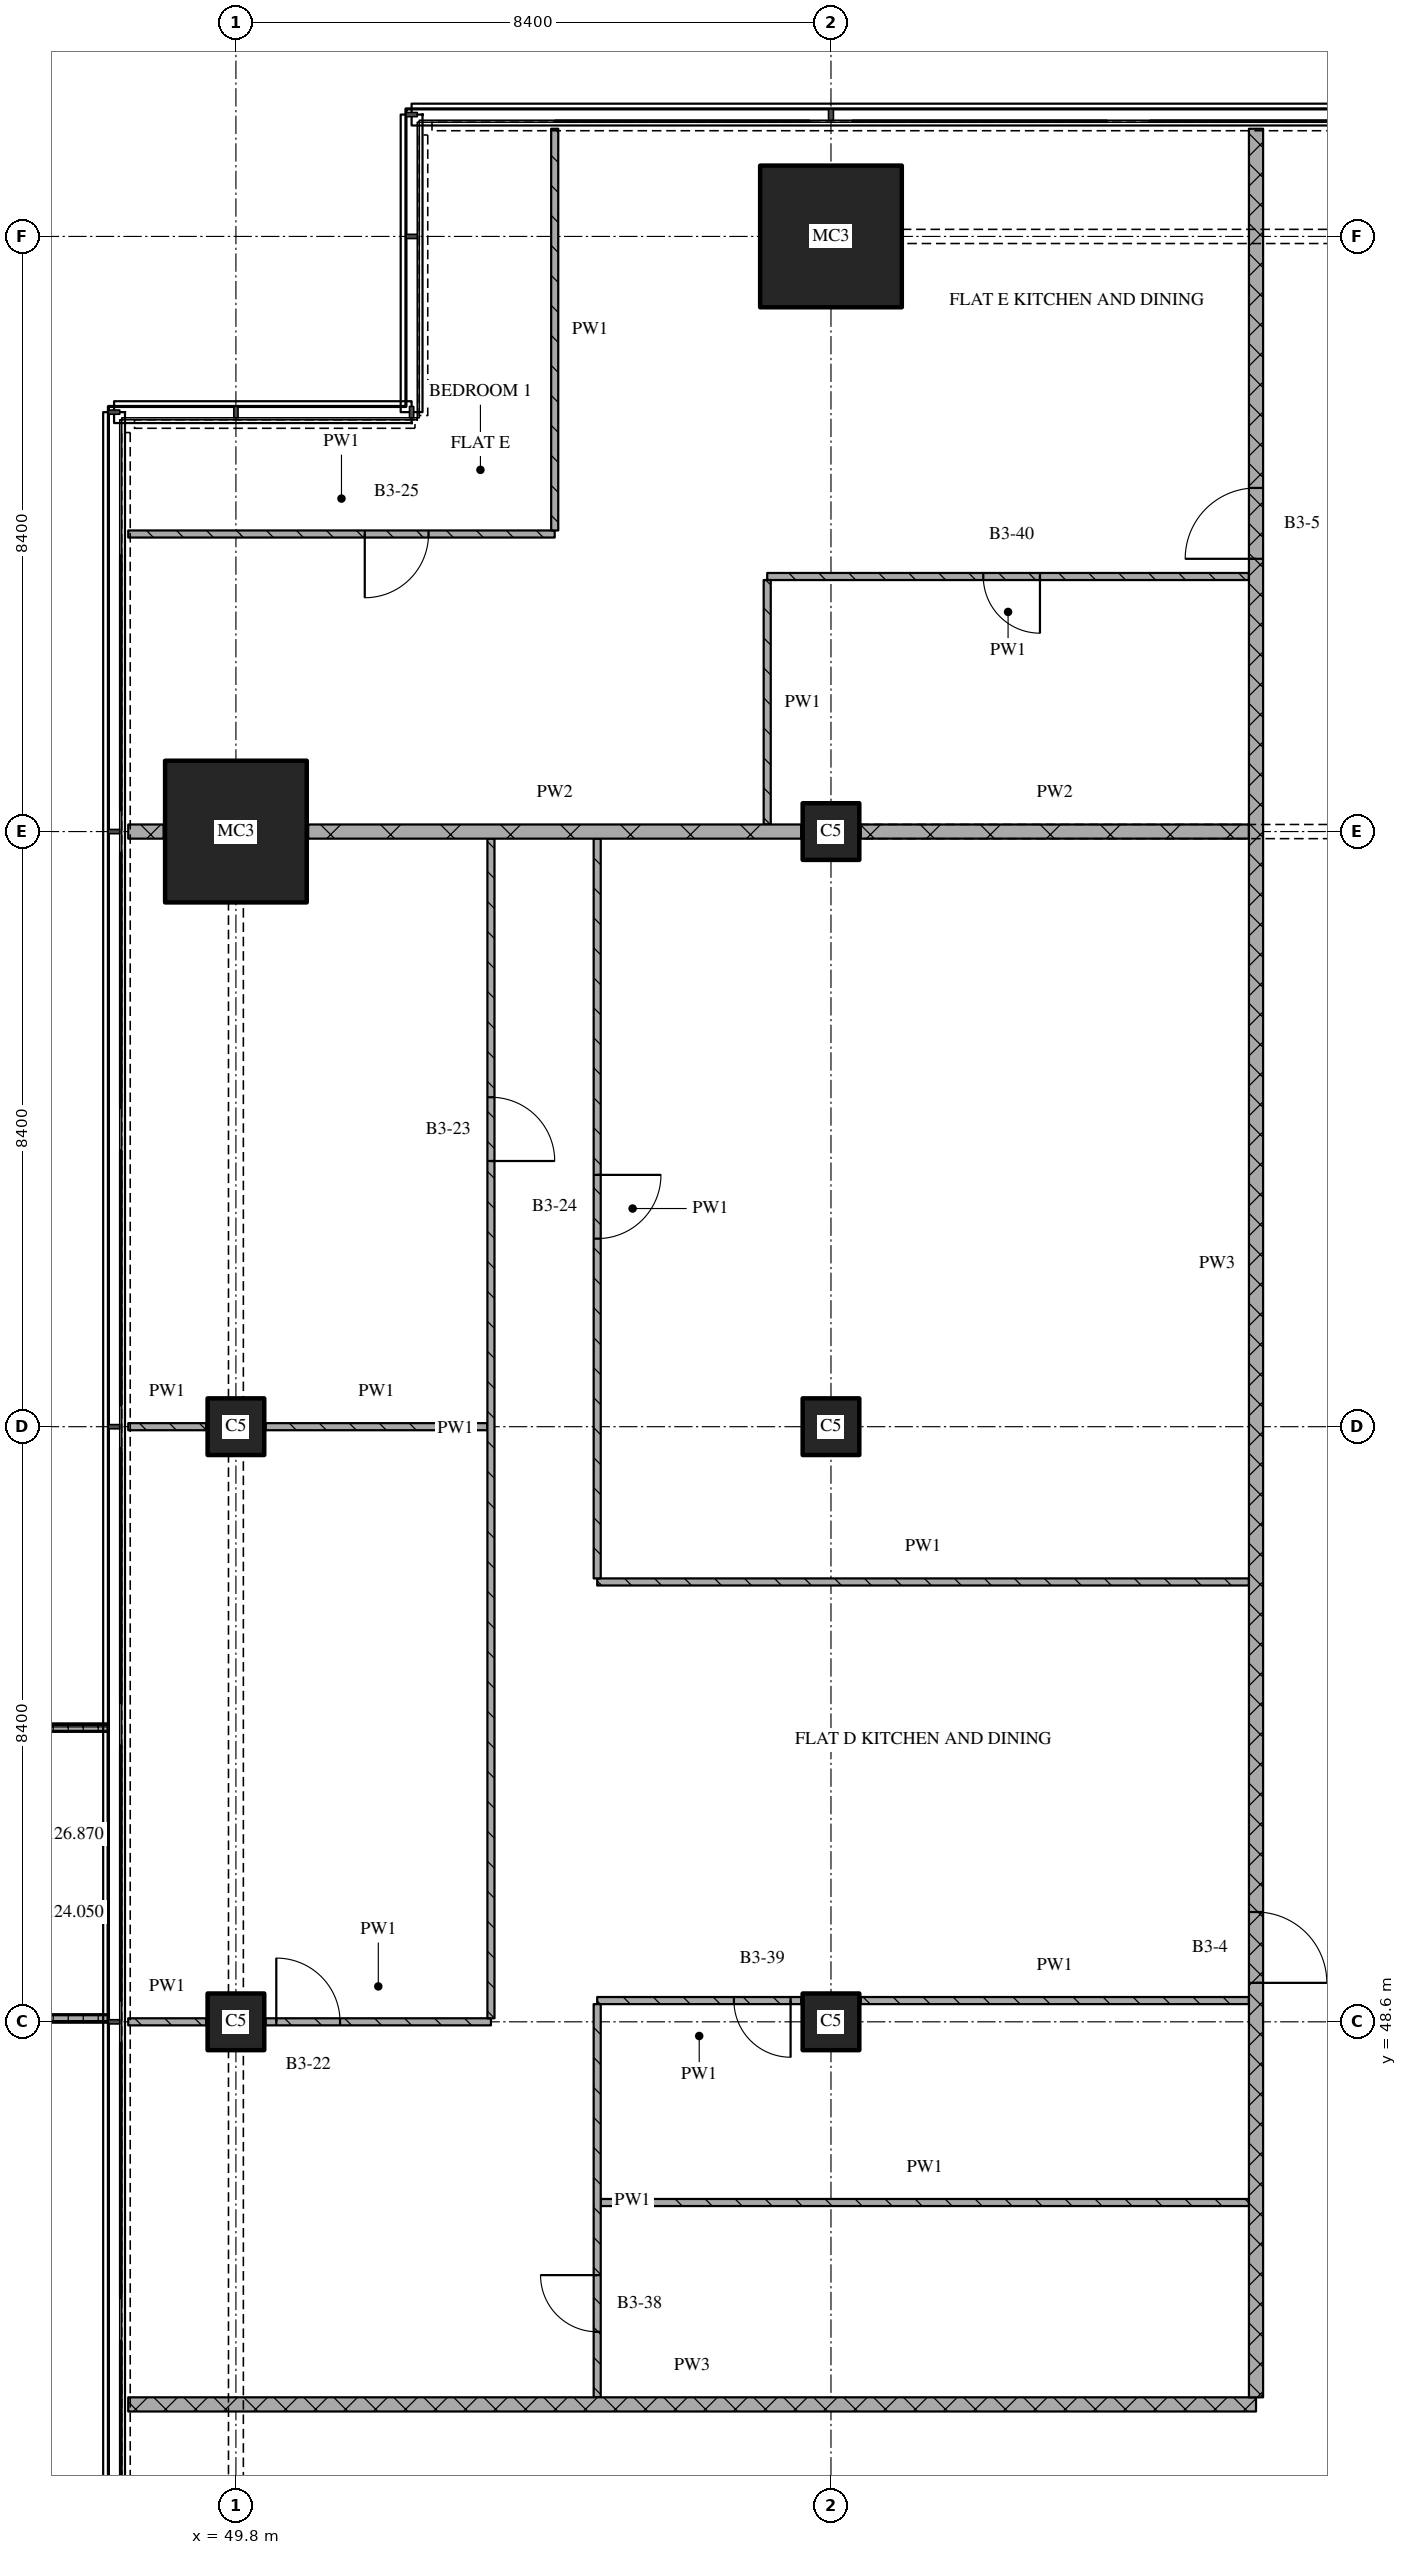
"""IFC4 building model, lengths in metres.
Left out: names, types, materials, properties, quantities, classifications, styles, units other than length and angle.
Written with IfcOpenShell. Run it as: python <this file> out.ifc"""

import sys

from ifc_helpers import new_model, si_unit, direction, frame, frame_2d, origin, origin_2d, place, context, subcontext, project, spatial, polyline, rectangle, outline, extrude, element, fill, save


model = new_model("IFC4")
c1 = context("Model", 3, precision=1e-05, world=origin(), true_north=direction((0.0, 1.0)))
c2 = subcontext(c1, "Body", "Model", "MODEL_VIEW")
j1 = project(units=[si_unit("LENGTHUNIT", "METRE"), si_unit("PLANEANGLEUNIT", "RADIAN")], contexts=[c1])
p1 = place(None, origin())
s1 = spatial("IfcSite", under=j1, at=p1, CompositionType="ELEMENT")
p2 = place(p1, origin())
s2 = spatial("IfcBuilding", under=s1, at=p2, CompositionType="ELEMENT")
p3 = place(p2, frame((0.0, 0.0, 124.05)))
s3 = spatial("IfcBuildingStorey", under=s2, at=p3, CompositionType="ELEMENT", Elevation=124.05)
for number, where, z_axis, x_axis in (
    (1, (49.8, 48.6, 0.0), (0.0, 0.0, 1.0), (1.0, 0.0, 0.0)),
    (2, (49.8, 57.0, 0.0), (0.0, 0.0, 1.0), (1.0, 0.0, 0.0)),
):
    element("IfcColumn", number, at=place(p3, frame(where, z_axis=z_axis, x_axis=x_axis)), inside=s3, PredefinedType="COLUMN", context=c2, shape_type="SweptSolid", body=[
        extrude(rectangle(XDim=0.8, YDim=0.8, at=origin_2d()), origin(), (0.0, 0.0, 1.0), 3.6),
    ])
p4 = place(p3, frame((49.8, 65.4, 0.0), z_axis=(0.0, 0.0, 1.0), x_axis=(1.0, 0.0, 0.0)))
e3 = element("IfcColumn", 3, at=p4, inside=s3, PredefinedType="COLUMN", context=c2, shape_type="SweptSolid", body=[
    extrude(rectangle(XDim=2.0, YDim=2.0, at=origin_2d()), origin(), (0.0, 0.0, 1.0), 3.6),
])
for number, where, z_axis, x_axis in (
    (4, (58.2, 48.6, 0.0), (0.0, 0.0, 1.0), (1.0, 0.0, 0.0)),
    (5, (58.2, 57.0, 0.0), (0.0, 0.0, 1.0), (1.0, 0.0, 0.0)),
    (6, (58.2, 65.4, 0.0), (0.0, 0.0, 1.0), (1.0, 0.0, 0.0)),
):
    element("IfcColumn", number, at=place(p3, frame(where, z_axis=z_axis, x_axis=x_axis)), inside=s3, PredefinedType="COLUMN", context=c2, shape_type="SweptSolid", body=[
        extrude(rectangle(XDim=0.8, YDim=0.8, at=origin_2d()), origin(), (0.0, 0.0, 1.0), 3.6),
    ])
p5 = place(p3, frame((58.2, 73.8, 0.0), z_axis=(0.0, 0.0, 1.0), x_axis=(1.0, 0.0, 0.0)))
e7 = element("IfcColumn", 7, at=p5, inside=s3, PredefinedType="COLUMN", context=c2, shape_type="SweptSolid", body=[
    extrude(rectangle(XDim=2.0, YDim=2.0, at=origin_2d()), origin(), (0.0, 0.0, 1.0), 3.6),
])
p6 = place(p3, origin())
e8 = element("IfcWall", 8, at=p6, inside=s3, PredefinedType="SOLIDWALL", context=c2, shape_type="SweptSolid", body=[
    extrude(outline(polyline([(48.0, 52.8), (48.0, 52.7), (46.367, 52.7), (46.367, 48.7), (48.0, 48.7), (48.0, 48.6), (46.267, 48.6), (46.267, 52.8), (48.0, 52.8)])), origin(), (0.0, 0.0, 1.0), 1.0),
])
p7 = place(p3, frame((48.28, 43.2, 0.0), z_axis=(0.0, 0.0, 1.0), x_axis=(1.0, 0.0, 0.0)))
e9 = element("IfcWall", 9, at=p7, inside=s3, PredefinedType="PARTITIONING", context=c2, shape_type="SweptSolid", body=[
    extrude(rectangle(XDim=15.92, YDim=0.2, at=frame_2d((7.96, 0.0))), origin(), (0.0, 0.0, 1.0), 3.32),
])
p8 = place(p3, frame((54.95, 46.05, 0.0), z_axis=(0.0, 0.0, 1.0), x_axis=(1.0, 0.0, 0.0)))
e10 = element("IfcWall", 10, at=p8, inside=s3, PredefinedType="PARTITIONING", context=c2, shape_type="SweptSolid", body=[
    extrude(rectangle(XDim=9.15, YDim=0.1, at=frame_2d((4.575, 0.0))), origin(), (0.0, 0.0, 1.0), 3.32),
])
p9 = place(p3, frame((48.28, 48.6, 0.0), z_axis=(0.0, 0.0, 1.0), x_axis=(1.0, 0.0, 0.0)))
e11 = element("IfcWall", 11, at=p9, inside=s3, PredefinedType="PARTITIONING", context=c2, shape_type="SweptSolid", body=[
    extrude(rectangle(XDim=1.1, YDim=0.1, at=frame_2d((0.55, 0.0))), origin(), (0.0, 0.0, 1.0), 3.32),
])
p10 = place(p3, frame((50.22, 48.6, 0.0), z_axis=(0.0, 0.0, 1.0), x_axis=(1.0, 0.0, 0.0)))
e12 = element("IfcWall", 12, at=p10, inside=s3, PredefinedType="PARTITIONING", context=c2, shape_type="SweptSolid", body=[
    extrude(rectangle(XDim=3.18, YDim=0.1, at=frame_2d((1.59, 0.0))), origin(), (0.0, 0.0, 1.0), 3.32),
])
p11 = place(p10, frame((0.15, 0.0, 0.0)))
e13 = element("IfcOpeningElement", 13, at=p11, cuts=e12, PredefinedType="OPENING", context=c2, shape_type="SweptSolid", body=[
    extrude(rectangle(XDim=0.9, YDim=2.1, at=frame_2d((0.45, 1.05))), frame((0.0, 0.06, 0.0), z_axis=(0.0, -1.0, 0.0), x_axis=(1.0, 0.0, 0.0)), (0.0, 0.0, 1.0), 0.12),
])
p12 = place(p3, frame((57.78, 48.9, 0.0), z_axis=(0.0, 0.0, 1.0), x_axis=(-1.0, 0.0, 0.0)))
e14 = element("IfcWall", 14, at=p12, inside=s3, PredefinedType="PARTITIONING", context=c2, shape_type="SweptSolid", body=[
    extrude(rectangle(XDim=2.88, YDim=0.1, at=frame_2d((1.44, 0.0))), origin(), (0.0, 0.0, 1.0), 3.32),
])
p13 = place(p12, frame((0.15, 0.0, 0.0)))
e15 = element("IfcOpeningElement", 15, at=p13, cuts=e14, PredefinedType="OPENING", context=c2, shape_type="SweptSolid", body=[
    extrude(rectangle(XDim=0.8, YDim=2.1, at=frame_2d((0.4, 1.05))), frame((0.0, 0.06, 0.0), z_axis=(0.0, -1.0, 0.0), x_axis=(1.0, 0.0, 0.0)), (0.0, 0.0, 1.0), 0.12),
])
p14 = place(p3, frame((58.62, 48.9, 0.0), z_axis=(0.0, 0.0, 1.0), x_axis=(1.0, 0.0, 0.0)))
e16 = element("IfcWall", 16, at=p14, inside=s3, PredefinedType="PARTITIONING", context=c2, shape_type="SweptSolid", body=[
    extrude(rectangle(XDim=5.48, YDim=0.1, at=frame_2d((2.74, 0.0))), origin(), (0.0, 0.0, 1.0), 3.32),
])
p15 = place(p3, frame((54.9, 54.809, 0.0), z_axis=(0.0, 0.0, 1.0), x_axis=(1.0, 0.0, 0.0)))
e17 = element("IfcWall", 17, at=p15, inside=s3, PredefinedType="PARTITIONING", context=c2, shape_type="SweptSolid", body=[
    extrude(rectangle(XDim=9.2, YDim=0.1, at=frame_2d((4.6, 0.0))), origin(), (0.0, 0.0, 1.0), 3.32),
])
p16 = place(p3, frame((48.28, 57.0, 0.0), z_axis=(0.0, 0.0, 1.0), x_axis=(1.0, 0.0, 0.0)))
e18 = element("IfcWall", 18, at=p16, inside=s3, PredefinedType="PARTITIONING", context=c2, shape_type="SweptSolid", body=[
    extrude(rectangle(XDim=1.1, YDim=0.1, at=frame_2d((0.55, 0.0))), origin(), (0.0, 0.0, 1.0), 3.32),
])
p17 = place(p3, frame((50.22, 57.0, 0.0), z_axis=(0.0, 0.0, 1.0), x_axis=(1.0, 0.0, 0.0)))
e19 = element("IfcWall", 19, at=p17, inside=s3, PredefinedType="PARTITIONING", context=c2, shape_type="SweptSolid", body=[
    extrude(rectangle(XDim=3.13, YDim=0.1, at=frame_2d((1.565, 0.0))), origin(), (0.0, 0.0, 1.0), 3.32),
])
p18 = place(p3, frame((48.28, 65.4, 0.0), z_axis=(0.0, 0.0, 1.0), x_axis=(1.0, 0.0, 0.0)))
e20 = element("IfcWall", 20, at=p18, inside=s3, PredefinedType="PARTITIONING", context=c2, shape_type="SweptSolid", body=[
    extrude(rectangle(XDim=0.5, YDim=0.2, at=frame_2d((0.25, 0.0))), origin(), (0.0, 0.0, 1.0), 3.32),
])
p19 = place(p3, frame((50.82, 65.4, 0.0), z_axis=(0.0, 0.0, 1.0), x_axis=(1.0, 0.0, 0.0)))
e21 = element("IfcWall", 21, at=p19, inside=s3, PredefinedType="PARTITIONING", context=c2, shape_type="SweptSolid", body=[
    extrude(rectangle(XDim=6.96, YDim=0.2, at=frame_2d((3.48, 0.0))), origin(), (0.0, 0.0, 1.0), 3.32),
])
p20 = place(p3, frame((58.62, 65.4, 0.0), z_axis=(0.0, 0.0, 1.0), x_axis=(1.0, 0.0, 0.0)))
e22 = element("IfcWall", 22, at=p20, inside=s3, PredefinedType="PARTITIONING", context=c2, shape_type="SweptSolid", body=[
    extrude(rectangle(XDim=5.48, YDim=0.2, at=frame_2d((2.74, 0.0))), origin(), (0.0, 0.0, 1.0), 2.82),
])
p21 = place(p3, frame((64.1, 69.0, 0.0), z_axis=(0.0, 0.0, 1.0), x_axis=(-1.0, 0.0, 0.0)))
e23 = element("IfcWall", 23, at=p21, inside=s3, PredefinedType="PARTITIONING", context=c2, shape_type="SweptSolid", body=[
    extrude(rectangle(XDim=6.8, YDim=0.1, at=frame_2d((3.4, 0.0))), origin(), (0.0, 0.0, 1.0), 3.32),
])
p22 = place(p21, frame((2.95, 0.0, 0.0)))
e24 = element("IfcOpeningElement", 24, at=p22, cuts=e23, PredefinedType="OPENING", context=c2, shape_type="SweptSolid", body=[
    extrude(rectangle(XDim=0.8, YDim=2.1, at=frame_2d((0.4, 1.05))), frame((0.0, 0.06, 0.0), z_axis=(0.0, -1.0, 0.0), x_axis=(1.0, 0.0, 0.0)), (0.0, 0.0, 1.0), 0.12),
])
p23 = place(p3, frame((48.28, 69.6, 0.0), z_axis=(0.0, 0.0, 1.0), x_axis=(1.0, 0.0, 0.0)))
e25 = element("IfcWall", 25, at=p23, inside=s3, PredefinedType="PARTITIONING", context=c2, shape_type="SweptSolid", body=[
    extrude(rectangle(XDim=6.02, YDim=0.1, at=frame_2d((3.01, 0.0))), origin(), (0.0, 0.0, 1.0), 3.32),
])
p24 = place(p23, frame((3.339, 0.0, 0.0)))
e26 = element("IfcOpeningElement", 26, at=p24, cuts=e25, PredefinedType="OPENING", context=c2, shape_type="SweptSolid", body=[
    extrude(rectangle(XDim=0.9, YDim=2.1, at=frame_2d((0.45, 1.05))), frame((0.0, 0.06, 0.0), z_axis=(0.0, -1.0, 0.0), x_axis=(1.0, 0.0, 0.0)), (0.0, 0.0, 1.0), 0.12),
])
p25 = place(p3, frame((53.4, 48.65, 0.0), z_axis=(0.0, 0.0, 1.0), x_axis=(0.0, 1.0, 0.0)))
e27 = element("IfcWall", 27, at=p25, inside=s3, PredefinedType="PARTITIONING", context=c2, shape_type="SweptSolid", body=[
    extrude(rectangle(XDim=16.65, YDim=0.1, at=frame_2d((8.325, 0.0))), origin(), (0.0, 0.0, 1.0), 3.32),
])
p26 = place(p25, frame((12.1, 0.0, 0.0)))
e28 = element("IfcOpeningElement", 28, at=p26, cuts=e27, PredefinedType="OPENING", context=c2, shape_type="SweptSolid", body=[
    extrude(rectangle(XDim=0.9, YDim=2.1, at=frame_2d((0.45, 1.05))), frame((0.0, 0.06, 0.0), z_axis=(0.0, -1.0, 0.0), x_axis=(1.0, 0.0, 0.0)), (0.0, 0.0, 1.0), 0.12),
])
p27 = place(p3, frame((54.3, 75.32, 0.0), z_axis=(0.0, 0.0, 1.0), x_axis=(0.0, -1.0, 0.0)))
e29 = element("IfcWall", 29, at=p27, inside=s3, PredefinedType="PARTITIONING", context=c2, shape_type="SweptSolid", body=[
    extrude(rectangle(XDim=5.67, YDim=0.1, at=frame_2d((2.835, 0.0))), origin(), (0.0, 0.0, 1.0), 3.32),
])
p28 = place(p3, frame((54.9, 48.85, 0.0), z_axis=(0.0, 0.0, 1.0), x_axis=(0.0, -1.0, 0.0)))
e30 = element("IfcWall", 30, at=p28, inside=s3, PredefinedType="PARTITIONING", context=c2, shape_type="SweptSolid", body=[
    extrude(rectangle(XDim=5.55, YDim=0.1, at=frame_2d((2.775, 0.0))), origin(), (0.0, 0.0, 1.0), 3.32),
])
p29 = place(p28, frame((3.825, 0.0, 0.0)))
e31 = element("IfcOpeningElement", 31, at=p29, cuts=e30, PredefinedType="OPENING", context=c2, shape_type="SweptSolid", body=[
    extrude(rectangle(XDim=0.8, YDim=2.1, at=frame_2d((0.4, 1.05))), frame((0.0, 0.06, 0.0), z_axis=(0.0, -1.0, 0.0), x_axis=(1.0, 0.0, 0.0)), (0.0, 0.0, 1.0), 0.12),
])
p30 = place(p3, frame((54.9, 65.3, 0.0), z_axis=(0.0, 0.0, 1.0), x_axis=(0.0, -1.0, 0.0)))
e32 = element("IfcWall", 32, at=p30, inside=s3, PredefinedType="PARTITIONING", context=c2, shape_type="SweptSolid", body=[
    extrude(rectangle(XDim=10.441, YDim=0.1, at=frame_2d((5.221, 0.0))), origin(), (0.0, 0.0, 1.0), 3.32),
])
p31 = place(p30, frame((4.746, 0.0, 0.0)))
e33 = element("IfcOpeningElement", 33, at=p31, cuts=e32, PredefinedType="OPENING", context=c2, shape_type="SweptSolid", body=[
    extrude(rectangle(XDim=0.9, YDim=2.1, at=frame_2d((0.45, 1.05))), frame((0.0, 0.06, 0.0), z_axis=(0.0, -1.0, 0.0), x_axis=(1.0, 0.0, 0.0)), (0.0, 0.0, 1.0), 0.12),
])
p32 = place(p3, frame((57.3, 68.95, 0.0), z_axis=(0.0, 0.0, 1.0), x_axis=(0.0, -1.0, 0.0)))
e34 = element("IfcWall", 34, at=p32, inside=s3, PredefinedType="PARTITIONING", context=c2, shape_type="SweptSolid", body=[
    extrude(rectangle(XDim=3.45, YDim=0.1, at=frame_2d((1.725, 0.0))), origin(), (0.0, 0.0, 1.0), 3.32),
])
p33 = place(p3, frame((64.2, 43.3, 0.0), z_axis=(0.0, 0.0, 1.0), x_axis=(0.0, 1.0, 0.0)))
e35 = element("IfcWall", 35, at=p33, inside=s3, PredefinedType="PARTITIONING", context=c2, shape_type="SweptSolid", body=[
    extrude(rectangle(XDim=32.02, YDim=0.2, at=frame_2d((16.01, 0.0))), origin(), (0.0, 0.0, 1.0), 3.32),
])
p34 = place(p33, frame((5.85, 0.0, 0.0)))
e36 = element("IfcOpeningElement", 36, at=p34, cuts=e35, PredefinedType="OPENING", context=c2, shape_type="SweptSolid", body=[
    extrude(rectangle(XDim=1.0, YDim=2.1, at=frame_2d((0.5, 1.05))), frame((0.0, 0.11, 0.0), z_axis=(0.0, -1.0, 0.0), x_axis=(1.0, 0.0, 0.0)), (0.0, 0.0, 1.0), 0.22),
])
p35 = place(p33, frame((25.95, 0.0, 0.0)))
e37 = element("IfcOpeningElement", 37, at=p35, cuts=e35, PredefinedType="OPENING", context=c2, shape_type="SweptSolid", body=[
    extrude(rectangle(XDim=1.0, YDim=2.1, at=frame_2d((0.5, 1.05))), frame((0.0, 0.11, 0.0), z_axis=(0.0, -1.0, 0.0), x_axis=(1.0, 0.0, 0.0)), (0.0, 0.0, 1.0), 0.22),
])
p36 = place(p11, origin())
e38 = element("IfcDoor", 38, at=p36, inside=s3, OperationType="SINGLE_SWING_LEFT", PredefinedType="DOOR", context=c2, shape_type="SweptSolid", body=[
    extrude(rectangle(XDim=0.9, YDim=2.1, at=frame_2d((0.45, 1.05))), frame((0.0, 0.025, 0.0), z_axis=(0.0, -1.0, 0.0), x_axis=(1.0, 0.0, 0.0)), (0.0, 0.0, 1.0), 0.05),
])
fill(e13, e38)
p37 = place(p13, origin())
e39 = element("IfcDoor", 39, at=p37, inside=s3, OperationType="SINGLE_SWING_LEFT", PredefinedType="DOOR", context=c2, shape_type="SweptSolid", body=[
    extrude(rectangle(XDim=0.8, YDim=2.1, at=frame_2d((0.4, 1.05))), frame((0.0, 0.025, 0.0), z_axis=(0.0, -1.0, 0.0), x_axis=(1.0, 0.0, 0.0)), (0.0, 0.0, 1.0), 0.05),
])
fill(e15, e39)
p38 = place(p22, origin())
e40 = element("IfcDoor", 40, at=p38, inside=s3, OperationType="SINGLE_SWING_LEFT", PredefinedType="DOOR", context=c2, shape_type="SweptSolid", body=[
    extrude(rectangle(XDim=0.8, YDim=2.1, at=frame_2d((0.4, 1.05))), frame((0.0, 0.025, 0.0), z_axis=(0.0, -1.0, 0.0), x_axis=(1.0, 0.0, 0.0)), (0.0, 0.0, 1.0), 0.05),
])
fill(e24, e40)
p39 = place(p24, origin())
e41 = element("IfcDoor", 41, at=p39, inside=s3, OperationType="SINGLE_SWING_RIGHT", PredefinedType="DOOR", context=c2, shape_type="SweptSolid", body=[
    extrude(rectangle(XDim=0.9, YDim=2.1, at=frame_2d((0.45, 1.05))), frame((0.0, 0.025, 0.0), z_axis=(0.0, -1.0, 0.0), x_axis=(1.0, 0.0, 0.0)), (0.0, 0.0, 1.0), 0.05),
])
fill(e26, e41)
p40 = place(p26, origin())
e42 = element("IfcDoor", 42, at=p40, inside=s3, OperationType="SINGLE_SWING_RIGHT", PredefinedType="DOOR", context=c2, shape_type="SweptSolid", body=[
    extrude(rectangle(XDim=0.9, YDim=2.1, at=frame_2d((0.45, 1.05))), frame((0.0, 0.025, 0.0), z_axis=(0.0, -1.0, 0.0), x_axis=(1.0, 0.0, 0.0)), (0.0, 0.0, 1.0), 0.05),
])
fill(e28, e42)
p41 = place(p29, origin())
e43 = element("IfcDoor", 43, at=p41, inside=s3, OperationType="SINGLE_SWING_RIGHT", PredefinedType="DOOR", context=c2, shape_type="SweptSolid", body=[
    extrude(rectangle(XDim=0.8, YDim=2.1, at=frame_2d((0.4, 1.05))), frame((0.0, 0.025, 0.0), z_axis=(0.0, -1.0, 0.0), x_axis=(1.0, 0.0, 0.0)), (0.0, 0.0, 1.0), 0.05),
])
fill(e31, e43)
p42 = place(p31, origin())
e44 = element("IfcDoor", 44, at=p42, inside=s3, OperationType="SINGLE_SWING_LEFT", PredefinedType="DOOR", context=c2, shape_type="SweptSolid", body=[
    extrude(rectangle(XDim=0.9, YDim=2.1, at=frame_2d((0.45, 1.05))), frame((0.0, 0.025, 0.0), z_axis=(0.0, -1.0, 0.0), x_axis=(1.0, 0.0, 0.0)), (0.0, 0.0, 1.0), 0.05),
])
fill(e33, e44)
p43 = place(p34, origin())
e45 = element("IfcDoor", 45, at=p43, inside=s3, OperationType="SINGLE_SWING_RIGHT", PredefinedType="DOOR", context=c2, shape_type="SweptSolid", body=[
    extrude(rectangle(XDim=1.0, YDim=2.1, at=frame_2d((0.5, 1.05))), frame((0.0, 0.025, 0.0), z_axis=(0.0, -1.0, 0.0), x_axis=(1.0, 0.0, 0.0)), (0.0, 0.0, 1.0), 0.05),
])
fill(e36, e45)
p44 = place(p35, origin())
e46 = element("IfcDoor", 46, at=p44, inside=s3, OperationType="SINGLE_SWING_LEFT", PredefinedType="DOOR", context=c2, shape_type="SweptSolid", body=[
    extrude(rectangle(XDim=1.0, YDim=2.1, at=frame_2d((0.5, 1.05))), frame((0.0, 0.025, 0.0), z_axis=(0.0, -1.0, 0.0), x_axis=(1.0, 0.0, 0.0)), (0.0, 0.0, 1.0), 0.05),
])
fill(e37, e46)
save(model, sys.argv[1])
